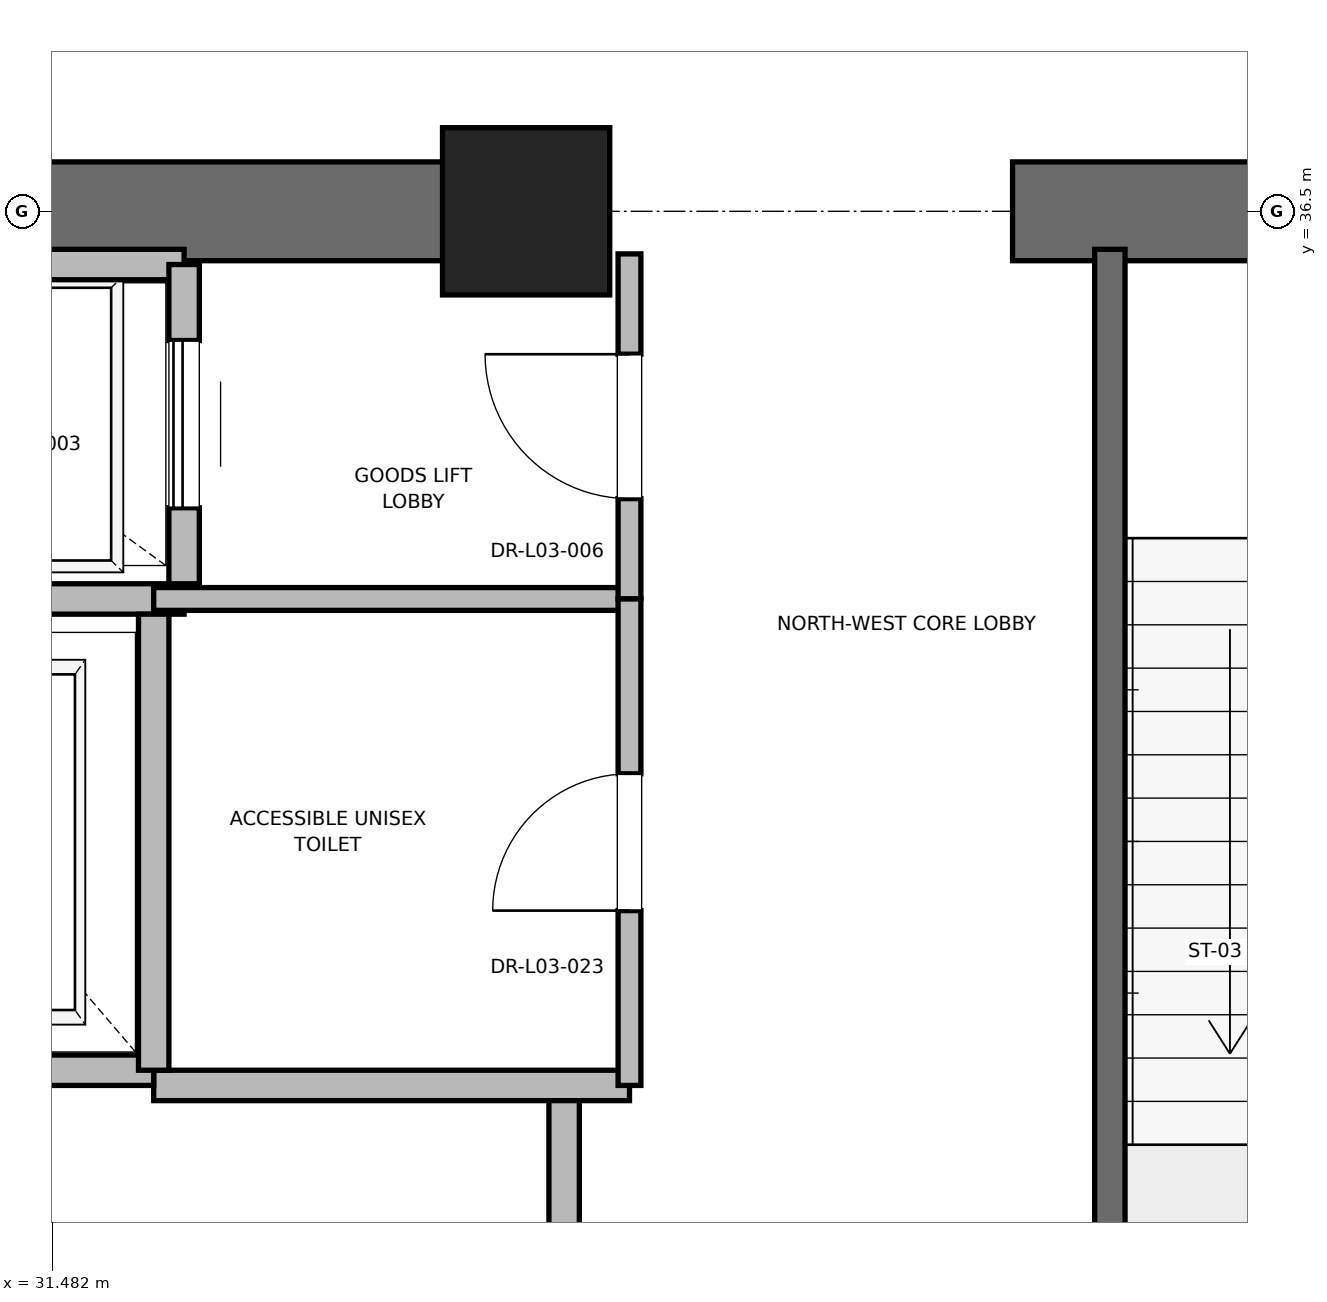
"""IFC4 building model, lengths in metres.
Left out: names, types, materials, properties, quantities, classifications, styles, units other than length and angle.
Written with IfcOpenShell. Run it as: python <this file> out.ifc"""

import sys

from ifc_helpers import new_model, si_unit, direction, frame, frame_2d, origin, origin_2d, place, context, subcontext, project, spatial, rectangle, extrude, element, fill, save


model = new_model("IFC4")
c1 = context("Model", 3, precision=1e-05, world=origin(), true_north=direction((0.0, 1.0)))
c2 = subcontext(c1, "Body", "Model", "MODEL_VIEW")
j1 = project(units=[si_unit("LENGTHUNIT", "METRE"), si_unit("PLANEANGLEUNIT", "RADIAN")], contexts=[c1])
p1 = place(None, origin())
s1 = spatial("IfcSite", under=j1, at=p1, CompositionType="ELEMENT")
p2 = place(p1, origin())
s2 = spatial("IfcBuilding", under=s1, at=p2, CompositionType="ELEMENT")
p3 = place(p2, frame((0.0, 0.0, 16.4)))
s3 = spatial("IfcBuildingStorey", under=s2, at=p3, CompositionType="ELEMENT", Elevation=16.4)
p4 = place(p3, frame((34.6, 36.5, 0.0), z_axis=(0.0, 0.0, 1.0), x_axis=(1.0, 0.0, 0.0)))
e1 = element("IfcColumn", 1, at=p4, inside=s3, PredefinedType="PILASTER", context=c2, shape_type="SweptSolid", body=[
    extrude(rectangle(XDim=1.1, YDim=1.1, at=origin_2d()), origin(), (0.0, 0.0, 1.0), 5.2),
])
p5 = place(p3, frame((29.0, 36.5, 0.0), z_axis=(0.0, 0.0, 1.0), x_axis=(1.0, 0.0, 0.0)))
e2 = element("IfcWall", 2, at=p5, inside=s3, PredefinedType="SHEAR", context=c2, shape_type="SweptSolid", body=[
    extrude(rectangle(XDim=5.8, YDim=0.65, at=frame_2d((2.9, 0.0))), origin(), (0.0, 0.0, 1.0), 4.9),
])
p6 = place(p3, frame((37.8, 36.5, 0.0), z_axis=(0.0, 0.0, 1.0), x_axis=(1.0, 0.0, 0.0)))
e3 = element("IfcWall", 3, at=p6, inside=s3, PredefinedType="SHEAR", context=c2, shape_type="SweptSolid", body=[
    extrude(rectangle(XDim=4.4, YDim=0.65, at=frame_2d((2.2, 0.0))), origin(), (0.0, 0.0, 1.0), 4.9),
])
p7 = place(p6, frame((1.65, 0.0, 0.0)))
e4 = element("IfcOpeningElement", 4, at=p7, cuts=e3, PredefinedType="OPENING", context=c2, shape_type="SweptSolid", body=[
    extrude(rectangle(XDim=1.1, YDim=2.15, at=frame_2d((0.55, 1.075))), frame((0.0, 0.325, 0.0), z_axis=(0.0, -1.0, 0.0), x_axis=(1.0, 0.0, 0.0)), (0.0, 0.0, 1.0), 0.65),
])
p8 = place(p3, frame((38.44, 27.38, 0.0), z_axis=(0.0, 0.0, 1.0), x_axis=(0.0, 1.0, 0.0)))
e5 = element("IfcWall", 5, at=p8, inside=s3, PredefinedType="SOLIDWALL", context=c2, shape_type="SweptSolid", body=[
    extrude(rectangle(XDim=8.87, YDim=0.2, at=frame_2d((4.435, 0.0))), origin(), (0.0, 0.0, 1.0), 4.9),
])
p9 = place(p3, frame((34.85, 27.38, 0.0), z_axis=(0.0, 0.0, 1.0), x_axis=(0.0, 1.0, 0.0)))
e6 = element("IfcWall", 6, at=p9, inside=s3, PredefinedType="PARTITIONING", context=c2, shape_type="SweptSolid", body=[
    extrude(rectangle(XDim=3.37, YDim=0.2, at=frame_2d((1.685, 0.0))), origin(), (0.0, 0.0, 1.0), 4.9),
])
p10 = place(p9, frame((1.11, 0.0, 0.0)))
e7 = element("IfcOpeningElement", 7, at=p10, cuts=e6, PredefinedType="OPENING", context=c2, shape_type="SweptSolid", body=[
    extrude(rectangle(XDim=1.15, YDim=2.2, at=frame_2d((0.575, 1.1))), frame((0.0, 0.1, 0.0), z_axis=(0.0, -1.0, 0.0), x_axis=(1.0, 0.0, 0.0)), (0.0, 0.0, 1.0), 0.2),
])
p11 = place(p3, frame((32.15, 30.75, 0.0), z_axis=(0.0, 0.0, 1.0), x_axis=(1.0, 0.0, 0.0)))
e8 = element("IfcWall", 8, at=p11, inside=s3, PredefinedType="PARTITIONING", context=c2, shape_type="SweptSolid", body=[
    extrude(rectangle(XDim=3.13, YDim=0.2, at=frame_2d((1.565, 0.0))), origin(), (0.0, 0.0, 1.0), 4.9),
])
p12 = place(p3, frame((29.55, 30.85, 0.0), z_axis=(0.0, 0.0, 1.0), x_axis=(1.0, 0.0, 0.0)))
e9 = element("IfcWall", 9, at=p12, inside=s3, PredefinedType="SOLIDWALL", context=c2, shape_type="SweptSolid", body=[
    extrude(rectangle(XDim=2.6, YDim=0.2, at=frame_2d((1.3, 0.0))), origin(), (0.0, 0.0, 1.0), 3.68),
])
p13 = place(p12, frame((0.75, 0.0, 0.0)))
e10 = element("IfcOpeningElement", 10, at=p13, cuts=e9, PredefinedType="OPENING", context=c2, shape_type="SweptSolid", body=[
    extrude(rectangle(XDim=1.1, YDim=2.2, at=frame_2d((0.55, 1.1))), frame((0.0, 0.1, 0.0), z_axis=(0.0, -1.0, 0.0), x_axis=(1.0, 0.0, 0.0)), (0.0, 0.0, 1.0), 0.2),
])
p14 = place(p3, frame((29.55, 33.95, 0.0), z_axis=(0.0, 0.0, 1.0), x_axis=(1.0, 0.0, 0.0)))
e11 = element("IfcWall", 11, at=p14, inside=s3, PredefinedType="SOLIDWALL", context=c2, shape_type="SweptSolid", body=[
    extrude(rectangle(XDim=2.8, YDim=0.2, at=frame_2d((1.4, 0.0))), origin(), (0.0, 0.0, 1.0), 4.9),
])
p15 = place(p3, frame((32.15, 30.85, 0.0), z_axis=(0.0, 0.0, 1.0), x_axis=(0.0, 1.0, 0.0)))
e12 = element("IfcWall", 12, at=p15, inside=s3, PredefinedType="SOLIDWALL", context=c2, shape_type="SweptSolid", body=[
    extrude(rectangle(XDim=3.0, YDim=0.2, at=frame_2d((1.5, 0.0))), origin(), (0.0, 0.0, 1.0), 4.9),
])
p16 = place(p3, frame((32.35, 36.15, 0.0), z_axis=(0.0, 0.0, 1.0), x_axis=(-1.0, 0.0, 0.0)))
e13 = element("IfcWall", 13, at=p16, inside=s3, PredefinedType="SOLIDWALL", context=c2, shape_type="SweptSolid", body=[
    extrude(rectangle(XDim=2.8, YDim=0.2, at=frame_2d((1.4, 0.0))), origin(), (0.0, 0.0, 1.0), 3.959),
])
p17 = place(p3, frame((32.35, 34.05, 0.0), z_axis=(0.0, 0.0, 1.0), x_axis=(0.0, 1.0, 0.0)))
e14 = element("IfcWall", 14, at=p17, inside=s3, PredefinedType="SOLIDWALL", context=c2, shape_type="SweptSolid", body=[
    extrude(rectangle(XDim=2.1, YDim=0.2, at=frame_2d((1.05, 0.0))), origin(), (0.0, 0.0, 1.0), 4.9),
])
p18 = place(p17, frame((0.5, 0.0, 0.0)))
e15 = element("IfcOpeningElement", 15, at=p18, cuts=e14, PredefinedType="OPENING", context=c2, shape_type="SweptSolid", body=[
    extrude(rectangle(XDim=1.1, YDim=2.2, at=frame_2d((0.55, 1.1))), frame((0.0, 0.1, 0.0), z_axis=(0.0, -1.0, 0.0), x_axis=(1.0, 0.0, 0.0)), (0.0, 0.0, 1.0), 0.2),
])
p19 = place(p3, frame((32.15, 33.95, 0.0), z_axis=(0.0, 0.0, 1.0), x_axis=(1.0, 0.0, 0.0)))
e16 = element("IfcWall", 16, at=p19, inside=s3, PredefinedType="PARTITIONING", context=c2, shape_type="SweptSolid", body=[
    extrude(rectangle(XDim=3.13, YDim=0.15, at=frame_2d((1.565, 0.0))), origin(), (0.0, 0.0, 1.0), 2.85),
])
p20 = place(p3, frame((35.28, 33.95, 0.0), z_axis=(0.0, 0.0, 1.0), x_axis=(0.0, 1.0, 0.0)))
e17 = element("IfcWall", 17, at=p20, inside=s3, PredefinedType="PARTITIONING", context=c2, shape_type="SweptSolid", body=[
    extrude(rectangle(XDim=2.27, YDim=0.15, at=frame_2d((1.135, 0.0))), origin(), (0.0, 0.0, 1.0), 2.85),
])
p21 = place(p20, frame((0.66, 0.0, 0.0)))
e18 = element("IfcOpeningElement", 18, at=p21, cuts=e17, PredefinedType="OPENING", context=c2, shape_type="SweptSolid", body=[
    extrude(rectangle(XDim=0.95, YDim=2.15, at=frame_2d((0.475, 1.075))), frame((0.0, 0.075, 0.0), z_axis=(0.0, -1.0, 0.0), x_axis=(1.0, 0.0, 0.0)), (0.0, 0.0, 1.0), 0.15),
])
p22 = place(p3, frame((35.28, 30.75, 0.0), z_axis=(0.0, 0.0, 1.0), x_axis=(0.0, 1.0, 0.0)))
e19 = element("IfcWall", 19, at=p22, inside=s3, PredefinedType="PARTITIONING", context=c2, shape_type="SweptSolid", body=[
    extrude(rectangle(XDim=3.2, YDim=0.15, at=frame_2d((1.6, 0.0))), origin(), (0.0, 0.0, 1.0), 2.85),
])
p23 = place(p22, frame((1.15, 0.0, 0.0)))
e20 = element("IfcOpeningElement", 20, at=p23, cuts=e19, PredefinedType="OPENING", context=c2, shape_type="SweptSolid", body=[
    extrude(rectangle(XDim=0.9, YDim=2.1, at=frame_2d((0.45, 1.05))), frame((0.0, 0.075, 0.0), z_axis=(0.0, -1.0, 0.0), x_axis=(1.0, 0.0, 0.0)), (0.0, 0.0, 1.0), 0.15),
])
p24 = place(p18, origin())
e21 = element("IfcDoor", 21, at=p24, inside=s3, OperationType="SLIDING_TO_RIGHT", PredefinedType="DOOR", context=c2, shape_type="SweptSolid", body=[
    extrude(rectangle(XDim=1.1, YDim=2.2, at=frame_2d((0.55, 1.1))), frame((0.0, 0.025, 0.0), z_axis=(0.0, -1.0, 0.0), x_axis=(1.0, 0.0, 0.0)), (0.0, 0.0, 1.0), 0.05),
])
fill(e15, e21)
p25 = place(p21, origin())
e22 = element("IfcDoor", 22, at=p25, inside=s3, OperationType="SINGLE_SWING_RIGHT", PredefinedType="DOOR", context=c2, shape_type="SweptSolid", body=[
    extrude(rectangle(XDim=0.95, YDim=2.15, at=frame_2d((0.475, 1.075))), frame((0.0, 0.025, 0.0), z_axis=(0.0, -1.0, 0.0), x_axis=(1.0, 0.0, 0.0)), (0.0, 0.0, 1.0), 0.05),
])
fill(e18, e22)
p26 = place(p23, origin())
e23 = element("IfcDoor", 23, at=p26, inside=s3, OperationType="SINGLE_SWING_LEFT", PredefinedType="DOOR", context=c2, shape_type="SweptSolid", body=[
    extrude(rectangle(XDim=0.9, YDim=2.1, at=frame_2d((0.45, 1.05))), frame((0.0, 0.025, 0.0), z_axis=(0.0, -1.0, 0.0), x_axis=(1.0, 0.0, 0.0)), (0.0, 0.0, 1.0), 0.05),
])
fill(e20, e23)
save(model, sys.argv[1])
